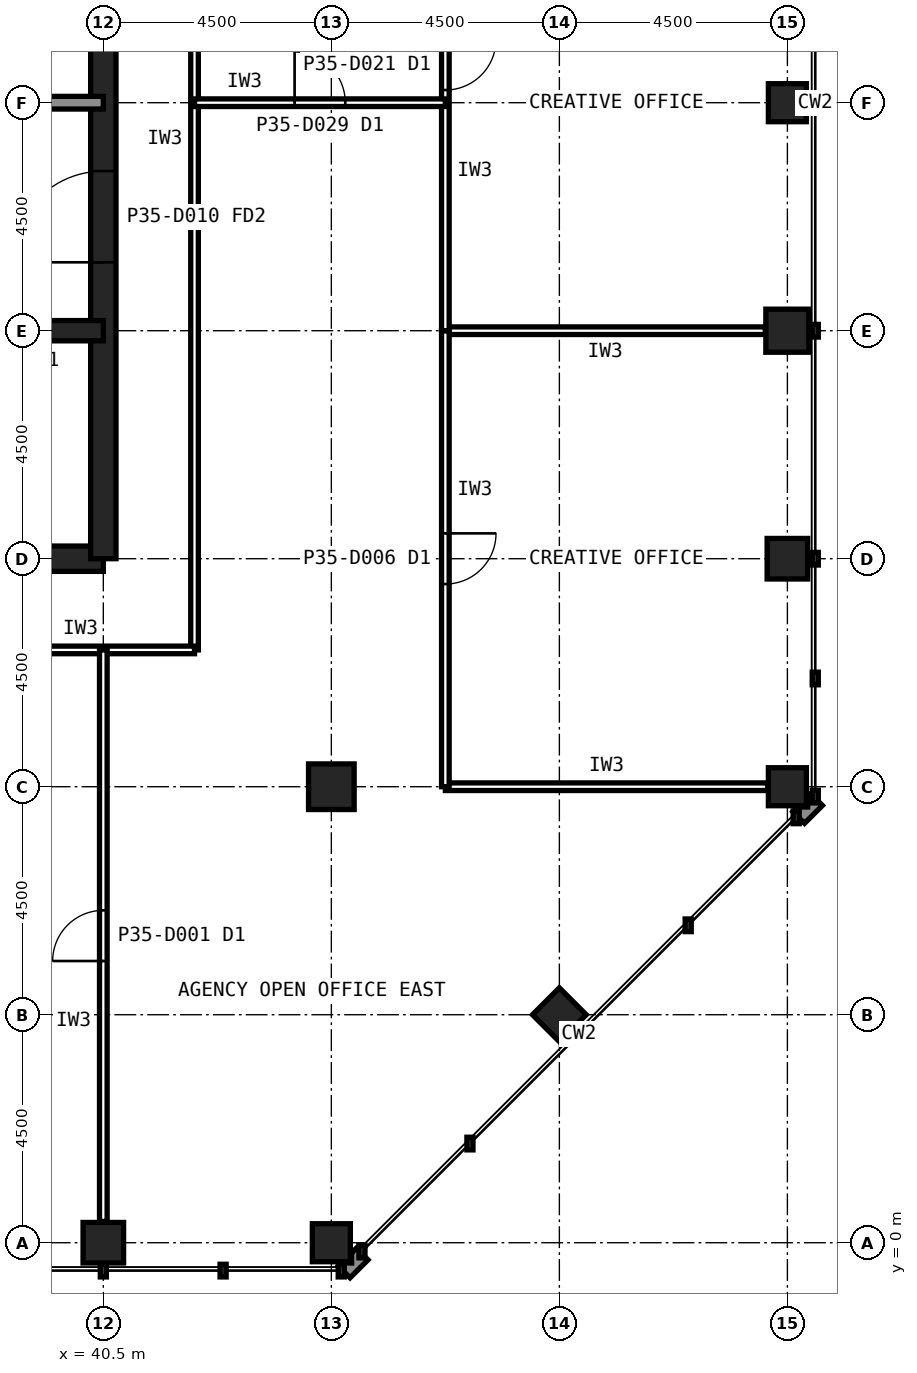
"""IFC4 building model, lengths in metres.
Left out: names, types, materials, properties, quantities, classifications, styles, units other than length and angle.
Written with IfcOpenShell. Run it as: python <this file> out.ifc"""

import sys

from ifc_helpers import new_model, si_unit, direction, frame, frame_2d, origin, origin_2d, place, context, subcontext, project, spatial, rectangle, hollow_rectangle, extrude, element, fill, save


model = new_model("IFC4")
c1 = context("Model", 3, precision=1e-05, world=origin(), true_north=direction((0.0, 1.0)))
c2 = subcontext(c1, "Body", "Model", "MODEL_VIEW")
j1 = project(units=[si_unit("LENGTHUNIT", "METRE"), si_unit("PLANEANGLEUNIT", "RADIAN")], contexts=[c1])
p1 = place(None, origin())
s1 = spatial("IfcSite", under=j1, at=p1, CompositionType="ELEMENT")
p2 = place(p1, origin())
s2 = spatial("IfcBuilding", under=s1, at=p2, CompositionType="ELEMENT")
p3 = place(p2, frame((0.0, 0.0, 151.6)))
s3 = spatial("IfcBuildingStorey", under=s2, at=p3, CompositionType="ELEMENT", Elevation=151.6)
p4 = place(p3, frame((40.5, 0.0, 0.0), z_axis=(0.0, 0.0, 1.0), x_axis=(1.0, 0.0, 0.0)))
e1 = element("IfcColumn", 1, at=p4, inside=s3, PredefinedType="COLUMN", context=c2, shape_type="SweptSolid", body=[
    extrude(hollow_rectangle(XDim=0.8, YDim=0.8, WallThickness=0.045, at=origin_2d()), origin(), (0.0, 0.0, 1.0), 4.0),
])
for number, where, z_axis, x_axis in (
    (2, (45.0, 0.0, 0.0), (0.0, 0.0, 1.0), (1.0, 0.0, 0.0)),
    (3, (54.0, 9.0, 0.0), (0.0, 0.0, 1.0), (1.0, 0.0, 0.0)),
):
    element("IfcColumn", number, at=place(p3, frame(where, z_axis=z_axis, x_axis=x_axis)), inside=s3, PredefinedType="COLUMN", context=c2, shape_type="SweptSolid", body=[
        extrude(hollow_rectangle(XDim=0.75, YDim=0.75, WallThickness=0.04, at=origin_2d()), origin(), (0.0, 0.0, 1.0), 4.0),
    ])
p5 = place(p3, frame((54.0, 13.5, 0.0), z_axis=(0.0, 0.0, 1.0), x_axis=(1.0, 0.0, 0.0)))
e4 = element("IfcColumn", 4, at=p5, inside=s3, PredefinedType="COLUMN", context=c2, shape_type="SweptSolid", body=[
    extrude(hollow_rectangle(XDim=0.8, YDim=0.8, WallThickness=0.045, at=origin_2d()), origin(), (0.0, 0.0, 1.0), 4.0),
])
p6 = place(p3, frame((54.0, 18.0, 0.0), z_axis=(0.0, 0.0, 1.0), x_axis=(1.0, 0.0, 0.0)))
e5 = element("IfcColumn", 5, at=p6, inside=s3, PredefinedType="COLUMN", context=c2, shape_type="SweptSolid", body=[
    extrude(hollow_rectangle(XDim=0.85, YDim=0.85, WallThickness=0.05, at=origin_2d()), origin(), (0.0, 0.0, 1.0), 4.0),
])
for number, where, z_axis, x_axis in (
    (6, (54.0, 22.5, 0.0), (0.0, 0.0, 1.0), (1.0, 0.0, 0.0)),
    (7, (49.5, 4.5, 0.0), (0.0, 0.0, 1.0), (0.707, 0.707, 0.0)),
):
    element("IfcColumn", number, at=place(p3, frame(where, z_axis=z_axis, x_axis=x_axis)), inside=s3, PredefinedType="COLUMN", context=c2, shape_type="SweptSolid", body=[
        extrude(hollow_rectangle(XDim=0.75, YDim=0.75, WallThickness=0.04, at=origin_2d()), origin(), (0.0, 0.0, 1.0), 4.0),
    ])
p7 = place(p3, frame((45.0, 9.0, 0.0), z_axis=(0.0, 0.0, 1.0), x_axis=(1.0, 0.0, 0.0)))
e8 = element("IfcColumn", 8, at=p7, inside=s3, PredefinedType="COLUMN", context=c2, shape_type="SweptSolid", body=[
    extrude(hollow_rectangle(XDim=0.9, YDim=0.9, WallThickness=0.063, at=origin_2d()), origin(), (0.0, 0.0, 1.0), 4.0),
])
p8 = place(p3, frame((13.5, 13.5, 0.0), z_axis=(0.0, 0.0, 1.0), x_axis=(1.0, 0.0, 0.0)))
e9 = element("IfcWall", 9, at=p8, inside=s3, PredefinedType="SHEAR", context=c2, shape_type="SweptSolid", body=[
    extrude(rectangle(XDim=27.0, YDim=0.5, at=frame_2d((13.5, 0.0))), origin(), (0.0, 0.0, 1.0), 4.0),
])
p9 = place(p3, frame((40.5, 13.5, 0.0), z_axis=(0.0, 0.0, 1.0), x_axis=(0.0, 1.0, 0.0)))
e10 = element("IfcWall", 10, at=p9, inside=s3, PredefinedType="SHEAR", context=c2, shape_type="SweptSolid", body=[
    extrude(rectangle(XDim=27.0, YDim=0.5, at=frame_2d((13.5, 0.0))), origin(), (0.0, 0.0, 1.0), 4.0),
])
p10 = place(p9, frame((5.85, 0.0, 0.0)))
e11 = element("IfcOpeningElement", 11, at=p10, cuts=e10, PredefinedType="OPENING", context=c2, shape_type="SweptSolid", body=[
    extrude(rectangle(XDim=1.8, YDim=2.1, at=frame_2d((0.9, 1.05))), frame((0.0, 0.26, 0.0), z_axis=(0.0, -1.0, 0.0), x_axis=(1.0, 0.0, 0.0)), (0.0, 0.0, 1.0), 0.52),
])
p11 = place(p9, frame((19.65, 0.0, 0.0)))
e12 = element("IfcOpeningElement", 12, at=p11, cuts=e10, PredefinedType="OPENING", context=c2, shape_type="SweptSolid", body=[
    extrude(rectangle(XDim=1.2, YDim=2.1, at=frame_2d((0.6, 1.05))), frame((0.0, 0.26, 0.0), z_axis=(0.0, -1.0, 0.0), x_axis=(1.0, 0.0, 0.0)), (0.0, 0.0, 1.0), 0.52),
])
p12 = place(p3, frame((13.5, 18.0, 0.0), z_axis=(0.0, 0.0, 1.0), x_axis=(1.0, 0.0, 0.0)))
e13 = element("IfcWall", 13, at=p12, inside=s3, PredefinedType="SHEAR", context=c2, shape_type="SweptSolid", body=[
    extrude(rectangle(XDim=27.0, YDim=0.4, at=frame_2d((13.5, 0.0))), origin(), (0.0, 0.0, 1.0), 4.0),
])
p13 = place(p12, frame((24.3, 0.0, 0.0)))
e14 = element("IfcOpeningElement", 14, at=p13, cuts=e13, PredefinedType="OPENING", context=c2, shape_type="SweptSolid", body=[
    extrude(rectangle(XDim=0.9, YDim=2.1, at=frame_2d((0.45, 1.05))), frame((0.0, 0.21, 0.0), z_axis=(0.0, -1.0, 0.0), x_axis=(1.0, 0.0, 0.0)), (0.0, 0.0, 1.0), 0.42),
])
p14 = place(p12, frame((5.45, 0.0, 0.0)))
e15 = element("IfcOpeningElement", 15, at=p14, cuts=e13, PredefinedType="OPENING", context=c2, shape_type="SweptSolid", body=[
    extrude(rectangle(XDim=1.1, YDim=2.1, at=frame_2d((0.55, 1.05))), frame((0.0, 0.21, 0.0), z_axis=(0.0, -1.0, 0.0), x_axis=(1.0, 0.0, 0.0)), (0.0, 0.0, 1.0), 0.42),
])
p15 = place(p12, frame((8.45, 0.0, 0.0)))
e16 = element("IfcOpeningElement", 16, at=p15, cuts=e13, PredefinedType="OPENING", context=c2, shape_type="SweptSolid", body=[
    extrude(rectangle(XDim=1.1, YDim=2.1, at=frame_2d((0.55, 1.05))), frame((0.0, 0.21, 0.0), z_axis=(0.0, -1.0, 0.0), x_axis=(1.0, 0.0, 0.0)), (0.0, 0.0, 1.0), 0.42),
])
p16 = place(p12, frame((11.45, 0.0, 0.0)))
e17 = element("IfcOpeningElement", 17, at=p16, cuts=e13, PredefinedType="OPENING", context=c2, shape_type="SweptSolid", body=[
    extrude(rectangle(XDim=1.1, YDim=2.1, at=frame_2d((0.55, 1.05))), frame((0.0, 0.21, 0.0), z_axis=(0.0, -1.0, 0.0), x_axis=(1.0, 0.0, 0.0)), (0.0, 0.0, 1.0), 0.42),
])
p17 = place(p12, frame((14.45, 0.0, 0.0)))
e18 = element("IfcOpeningElement", 18, at=p17, cuts=e13, PredefinedType="OPENING", context=c2, shape_type="SweptSolid", body=[
    extrude(rectangle(XDim=1.1, YDim=2.1, at=frame_2d((0.55, 1.05))), frame((0.0, 0.21, 0.0), z_axis=(0.0, -1.0, 0.0), x_axis=(1.0, 0.0, 0.0)), (0.0, 0.0, 1.0), 0.42),
])
p18 = place(p12, frame((17.45, 0.0, 0.0)))
e19 = element("IfcOpeningElement", 19, at=p18, cuts=e13, PredefinedType="OPENING", context=c2, shape_type="SweptSolid", body=[
    extrude(rectangle(XDim=1.1, YDim=2.1, at=frame_2d((0.55, 1.05))), frame((0.0, 0.21, 0.0), z_axis=(0.0, -1.0, 0.0), x_axis=(1.0, 0.0, 0.0)), (0.0, 0.0, 1.0), 0.42),
])
p19 = place(p12, frame((20.45, 0.0, 0.0)))
e20 = element("IfcOpeningElement", 20, at=p19, cuts=e13, PredefinedType="OPENING", context=c2, shape_type="SweptSolid", body=[
    extrude(rectangle(XDim=1.1, YDim=2.1, at=frame_2d((0.55, 1.05))), frame((0.0, 0.21, 0.0), z_axis=(0.0, -1.0, 0.0), x_axis=(1.0, 0.0, 0.0)), (0.0, 0.0, 1.0), 0.42),
])
p20 = place(p12, frame((1.6, 0.0, 0.0)))
e21 = element("IfcOpeningElement", 21, at=p20, cuts=e13, PredefinedType="OPENING", context=c2, shape_type="SweptSolid", body=[
    extrude(rectangle(XDim=1.3, YDim=2.2, at=frame_2d((0.65, 1.1))), frame((0.0, 0.21, 0.0), z_axis=(0.0, -1.0, 0.0), x_axis=(1.0, 0.0, 0.0)), (0.0, 0.0, 1.0), 0.42),
])
p21 = place(p3, frame((13.5, 22.5, 0.0), z_axis=(0.0, 0.0, 1.0), x_axis=(1.0, 0.0, 0.0)))
e22 = element("IfcWall", 22, at=p21, inside=s3, PredefinedType="SOLIDWALL", context=c2, shape_type="SweptSolid", body=[
    extrude(rectangle(XDim=27.0, YDim=0.25, at=frame_2d((13.5, 0.0))), origin(), (0.0, 0.0, 1.0), 3.84),
])
p22 = place(p21, frame((1.65, 0.0, 0.0)))
e23 = element("IfcOpeningElement", 23, at=p22, cuts=e22, PredefinedType="OPENING", context=c2, shape_type="SweptSolid", body=[
    extrude(rectangle(XDim=1.2, YDim=2.1, at=frame_2d((0.6, 1.05))), frame((0.0, 0.135, 0.0), z_axis=(0.0, -1.0, 0.0), x_axis=(1.0, 0.0, 0.0)), (0.0, 0.0, 1.0), 0.27),
])
p23 = place(p21, frame((6.025, 0.0, 0.0)))
e24 = element("IfcOpeningElement", 24, at=p23, cuts=e22, PredefinedType="OPENING", context=c2, shape_type="SweptSolid", body=[
    extrude(rectangle(XDim=1.0, YDim=2.1, at=frame_2d((0.5, 1.05))), frame((0.0, 0.135, 0.0), z_axis=(0.0, -1.0, 0.0), x_axis=(1.0, 0.0, 0.0)), (0.0, 0.0, 1.0), 0.27),
])
p24 = place(p21, frame((10.525, 0.0, 0.0)))
e25 = element("IfcOpeningElement", 25, at=p24, cuts=e22, PredefinedType="OPENING", context=c2, shape_type="SweptSolid", body=[
    extrude(rectangle(XDim=1.0, YDim=2.1, at=frame_2d((0.5, 1.05))), frame((0.0, 0.135, 0.0), z_axis=(0.0, -1.0, 0.0), x_axis=(1.0, 0.0, 0.0)), (0.0, 0.0, 1.0), 0.27),
])
p25 = place(p21, frame((19.75, 0.0, 0.0)))
e26 = element("IfcOpeningElement", 26, at=p25, cuts=e22, PredefinedType="OPENING", context=c2, shape_type="SweptSolid", body=[
    extrude(rectangle(XDim=1.0, YDim=2.1, at=frame_2d((0.5, 1.05))), frame((0.0, 0.135, 0.0), z_axis=(0.0, -1.0, 0.0), x_axis=(1.0, 0.0, 0.0)), (0.0, 0.0, 1.0), 0.27),
])
p26 = place(p21, frame((15.05, 0.0, 0.0)))
e27 = element("IfcOpeningElement", 27, at=p26, cuts=e22, PredefinedType="OPENING", context=c2, shape_type="SweptSolid", body=[
    extrude(rectangle(XDim=1.4, YDim=2.4, at=frame_2d((0.7, 1.2))), frame((0.0, 0.135, 0.0), z_axis=(0.0, -1.0, 0.0), x_axis=(1.0, 0.0, 0.0)), (0.0, 0.0, 1.0), 0.27),
])
p27 = place(p3, frame((42.3, 11.7, 0.0), z_axis=(0.0, 0.0, 1.0), x_axis=(0.0, 1.0, 0.0)))
e28 = element("IfcWall", 28, at=p27, inside=s3, PredefinedType="PARTITIONING", context=c2, shape_type="SweptSolid", body=[
    extrude(rectangle(XDim=28.8, YDim=0.15, at=frame_2d((14.4, 0.0))), origin(), (0.0, 0.0, 1.0), 3.84),
])
p28 = place(p27, frame((13.9, 0.0, 0.0)))
e29 = element("IfcOpeningElement", 29, at=p28, cuts=e28, PredefinedType="OPENING", context=c2, shape_type="SweptSolid", body=[
    extrude(rectangle(XDim=1.0, YDim=2.1, at=frame_2d((0.5, 1.05))), frame((0.0, 0.085, 0.0), z_axis=(0.0, -1.0, 0.0), x_axis=(1.0, 0.0, 0.0)), (0.0, 0.0, 1.0), 0.17),
])
p29 = place(p3, frame((37.8, 11.7, 0.0), z_axis=(0.0, 0.0, 1.0), x_axis=(1.0, 0.0, 0.0)))
e30 = element("IfcWall", 30, at=p29, inside=s3, PredefinedType="PARTITIONING", context=c2, shape_type="SweptSolid", body=[
    extrude(rectangle(XDim=4.5, YDim=0.15, at=frame_2d((2.25, 0.0))), origin(), (0.0, 0.0, 1.0), 3.84),
])
p30 = place(p3, frame((47.25, 9.0, 0.0), z_axis=(0.0, 0.0, 1.0), x_axis=(1.0, 0.0, 0.0)))
e31 = element("IfcWall", 31, at=p30, inside=s3, PredefinedType="PARTITIONING", context=c2, shape_type="SweptSolid", body=[
    extrude(rectangle(XDim=6.365, YDim=0.15, at=frame_2d((3.183, 0.0))), origin(), (0.0, 0.0, 1.0), 3.229),
])
p31 = place(p3, frame((53.565, 18.0, 0.0), z_axis=(0.0, 0.0, 1.0), x_axis=(-1.0, 0.0, 0.0)))
e32 = element("IfcWall", 32, at=p31, inside=s3, PredefinedType="PARTITIONING", context=c2, shape_type="SweptSolid", body=[
    extrude(rectangle(XDim=6.315, YDim=0.15, at=frame_2d((3.157, 0.0))), origin(), (0.0, 0.0, 1.0), 2.989),
])
p32 = place(p3, frame((47.25, 18.0, 0.0), z_axis=(0.0, 0.0, 1.0), x_axis=(0.0, -1.0, 0.0)))
e33 = element("IfcWall", 33, at=p32, inside=s3, PredefinedType="PARTITIONING", context=c2, shape_type="SweptSolid", body=[
    extrude(rectangle(XDim=9.0, YDim=0.15, at=frame_2d((4.5, 0.0))), origin(), (0.0, 0.0, 1.0), 3.84),
])
p33 = place(p32, frame((4.0, 0.0, 0.0)))
e34 = element("IfcOpeningElement", 34, at=p33, cuts=e33, PredefinedType="OPENING", context=c2, shape_type="SweptSolid", body=[
    extrude(rectangle(XDim=1.0, YDim=2.1, at=frame_2d((0.5, 1.05))), frame((0.0, 0.085, 0.0), z_axis=(0.0, -1.0, 0.0), x_axis=(1.0, 0.0, 0.0)), (0.0, 0.0, 1.0), 0.17),
])
p34 = place(p3, frame((47.25, 27.0, 0.0), z_axis=(0.0, 0.0, 1.0), x_axis=(0.0, -1.0, 0.0)))
e35 = element("IfcWall", 35, at=p34, inside=s3, PredefinedType="PARTITIONING", context=c2, shape_type="SweptSolid", body=[
    extrude(rectangle(XDim=9.0, YDim=0.15, at=frame_2d((4.5, 0.0))), origin(), (0.0, 0.0, 1.0), 3.84),
])
p35 = place(p34, frame((3.25, 0.0, 0.0)))
e36 = element("IfcOpeningElement", 36, at=p35, cuts=e35, PredefinedType="OPENING", context=c2, shape_type="SweptSolid", body=[
    extrude(rectangle(XDim=1.0, YDim=2.1, at=frame_2d((0.5, 1.05))), frame((0.0, 0.085, 0.0), z_axis=(0.0, -1.0, 0.0), x_axis=(1.0, 0.0, 0.0)), (0.0, 0.0, 1.0), 0.17),
])
p36 = place(p3, frame((40.5, 0.42, 0.0), z_axis=(0.0, 0.0, 1.0), x_axis=(0.0, 1.0, 0.0)))
e37 = element("IfcWall", 37, at=p36, inside=s3, PredefinedType="PARTITIONING", context=c2, shape_type="SweptSolid", body=[
    extrude(rectangle(XDim=11.28, YDim=0.15, at=frame_2d((5.64, 0.0))), origin(), (0.0, 0.0, 1.0), 2.989),
])
p37 = place(p36, frame((5.14, 0.0, 0.0)))
e38 = element("IfcOpeningElement", 38, at=p37, cuts=e37, PredefinedType="OPENING", context=c2, shape_type="SweptSolid", body=[
    extrude(rectangle(XDim=1.0, YDim=2.1, at=frame_2d((0.5, 1.05))), frame((0.0, 0.085, 0.0), z_axis=(0.0, -1.0, 0.0), x_axis=(1.0, 0.0, 0.0)), (0.0, 0.0, 1.0), 0.17),
])
p38 = place(p3, frame((42.3, 22.5, 0.0), z_axis=(0.0, 0.0, 1.0), x_axis=(1.0, 0.0, 0.0)))
e39 = element("IfcWall", 39, at=p38, inside=s3, PredefinedType="PARTITIONING", context=c2, shape_type="SweptSolid", body=[
    extrude(rectangle(XDim=4.95, YDim=0.15, at=frame_2d((2.475, 0.0))), origin(), (0.0, 0.0, 1.0), 2.989),
])
p39 = place(p38, frame((1.975, 0.0, 0.0)))
e40 = element("IfcOpeningElement", 40, at=p39, cuts=e39, PredefinedType="OPENING", context=c2, shape_type="SweptSolid", body=[
    extrude(rectangle(XDim=1.0, YDim=2.1, at=frame_2d((0.5, 1.05))), frame((0.0, 0.085, 0.0), z_axis=(0.0, -1.0, 0.0), x_axis=(1.0, 0.0, 0.0)), (0.0, 0.0, 1.0), 0.17),
])
p40 = place(p10, origin())
e41 = element("IfcDoor", 41, at=p40, inside=s3, OperationType="SINGLE_SWING_LEFT", PredefinedType="DOOR", context=c2, shape_type="SweptSolid", body=[
    extrude(rectangle(XDim=1.8, YDim=2.1, at=frame_2d((0.9, 1.05))), frame((0.0, 0.025, 0.0), z_axis=(0.0, -1.0, 0.0), x_axis=(1.0, 0.0, 0.0)), (0.0, 0.0, 1.0), 0.05),
])
fill(e11, e41)
p41 = place(p33, origin())
e42 = element("IfcDoor", 42, at=p41, inside=s3, OperationType="SINGLE_SWING_LEFT", PredefinedType="DOOR", context=c2, shape_type="SweptSolid", body=[
    extrude(rectangle(XDim=1.0, YDim=2.1, at=frame_2d((0.5, 1.05))), frame((0.0, 0.025, 0.0), z_axis=(0.0, -1.0, 0.0), x_axis=(1.0, 0.0, 0.0)), (0.0, 0.0, 1.0), 0.05),
])
fill(e34, e42)
p42 = place(p35, origin())
e43 = element("IfcDoor", 43, at=p42, inside=s3, OperationType="SINGLE_SWING_LEFT", PredefinedType="DOOR", context=c2, shape_type="SweptSolid", body=[
    extrude(rectangle(XDim=1.0, YDim=2.1, at=frame_2d((0.5, 1.05))), frame((0.0, 0.025, 0.0), z_axis=(0.0, -1.0, 0.0), x_axis=(1.0, 0.0, 0.0)), (0.0, 0.0, 1.0), 0.05),
])
fill(e36, e43)
p43 = place(p37, origin())
e44 = element("IfcDoor", 44, at=p43, inside=s3, OperationType="SINGLE_SWING_LEFT", PredefinedType="DOOR", context=c2, shape_type="SweptSolid", body=[
    extrude(rectangle(XDim=1.0, YDim=2.1, at=frame_2d((0.5, 1.05))), frame((0.0, 0.025, 0.0), z_axis=(0.0, -1.0, 0.0), x_axis=(1.0, 0.0, 0.0)), (0.0, 0.0, 1.0), 0.05),
])
fill(e38, e44)
p44 = place(p39, origin())
e45 = element("IfcDoor", 45, at=p44, inside=s3, OperationType="SINGLE_SWING_LEFT", PredefinedType="DOOR", context=c2, shape_type="SweptSolid", body=[
    extrude(rectangle(XDim=1.0, YDim=2.1, at=frame_2d((0.5, 1.05))), frame((0.0, 0.025, 0.0), z_axis=(0.0, -1.0, 0.0), x_axis=(1.0, 0.0, 0.0)), (0.0, 0.0, 1.0), 0.05),
])
fill(e40, e45)
save(model, sys.argv[1])
